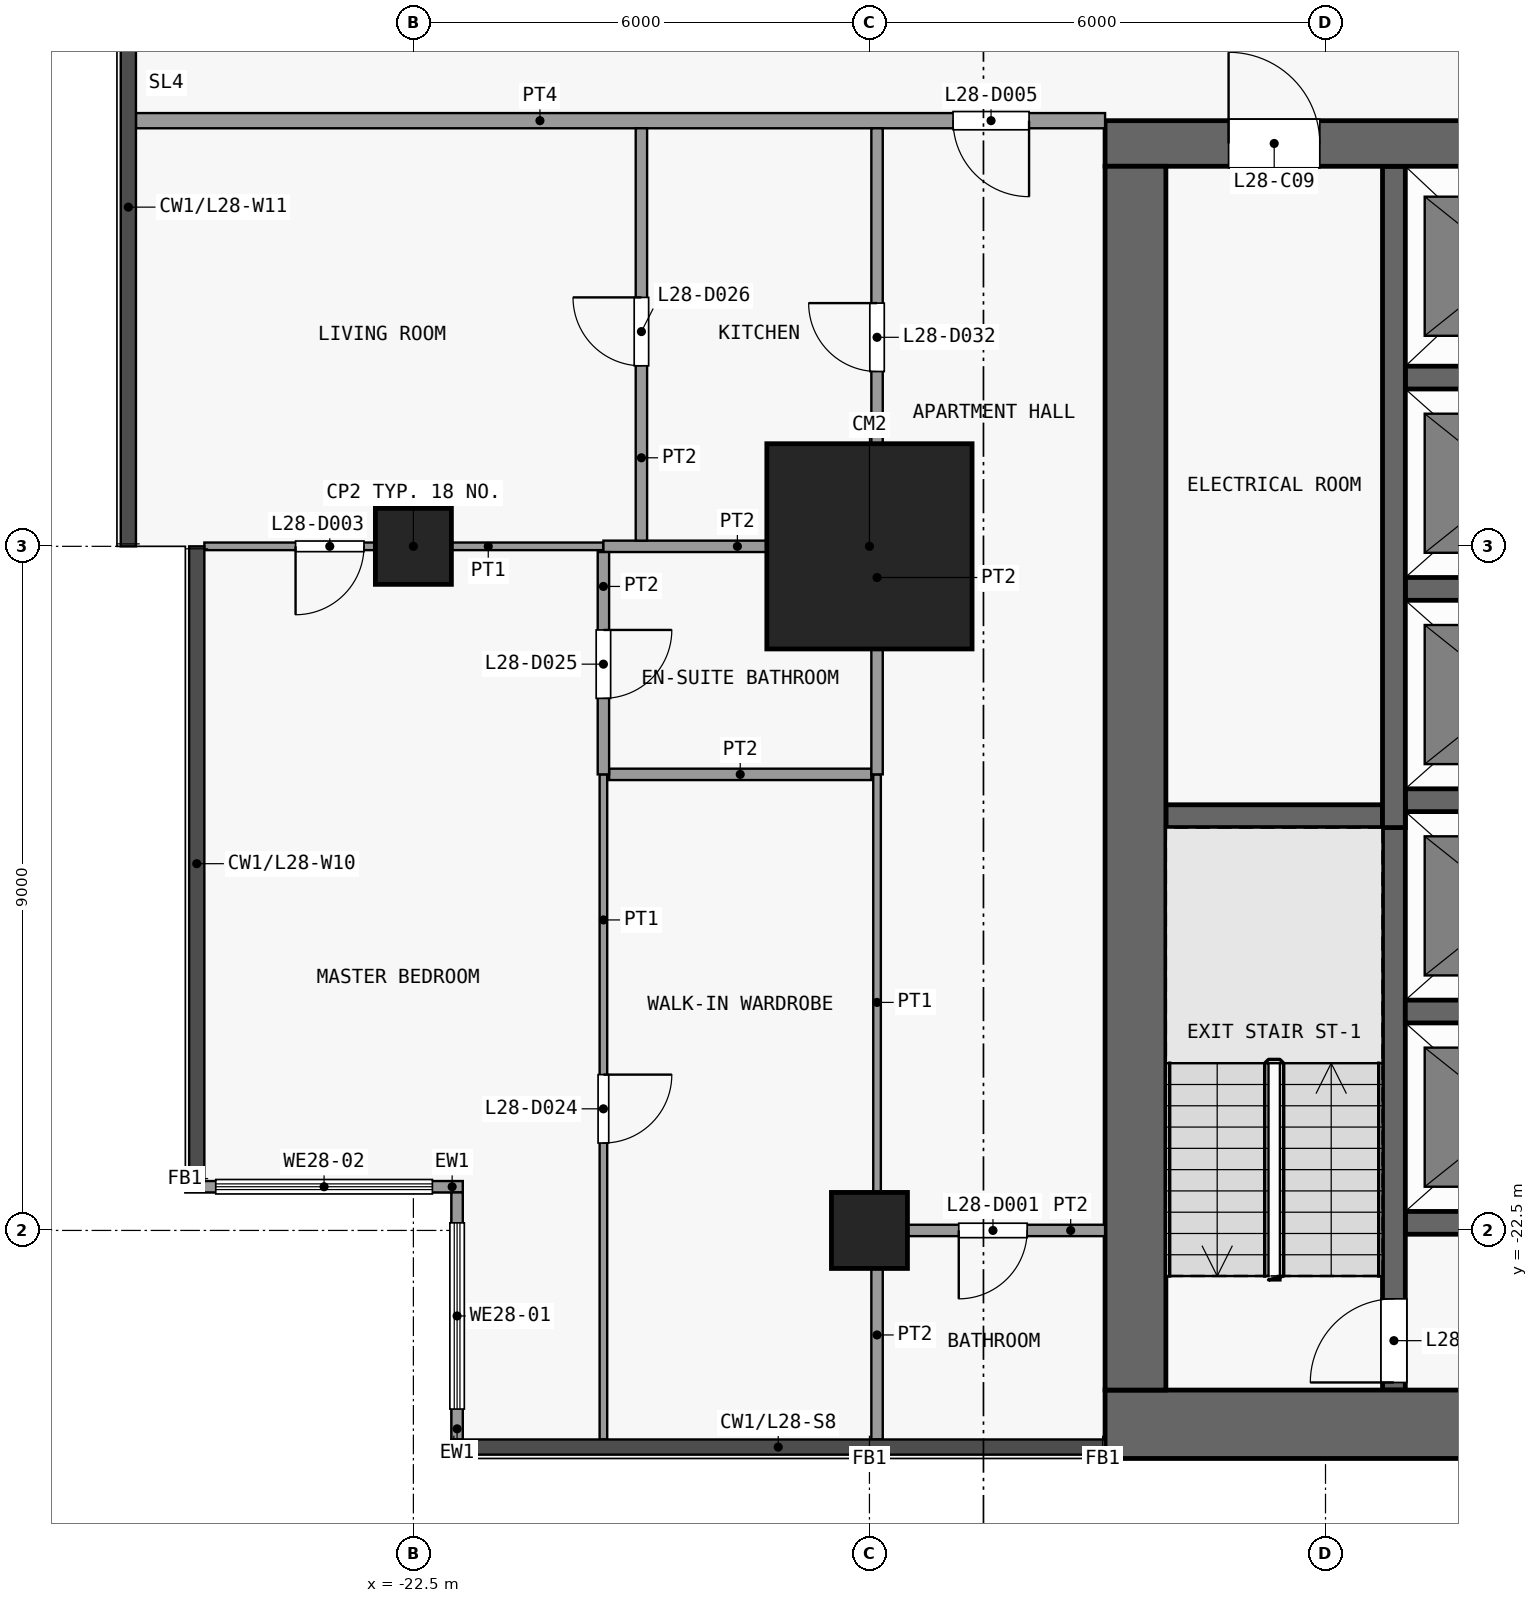
"""IFC4 building model, lengths in metres.
Left out: names, types, materials, properties, quantities, classifications, styles, units other than length and angle.
Written with IfcOpenShell. Run it as: python <this file> out.ifc"""

import sys

from ifc_helpers import new_model, si_unit, direction, frame, frame_2d, origin, origin_2d, place, context, subcontext, project, spatial, rectangle, extrude, element, fill, save


model = new_model("IFC4")
c1 = context("Model", 3, precision=1e-05, world=origin(), true_north=direction((0.0, 1.0)))
c2 = subcontext(c1, "Body", "Model", "MODEL_VIEW")
j1 = project(units=[si_unit("LENGTHUNIT", "METRE"), si_unit("PLANEANGLEUNIT", "RADIAN")], contexts=[c1])
p1 = place(None, origin())
s1 = spatial("IfcSite", under=j1, at=p1, CompositionType="ELEMENT")
p2 = place(p1, origin())
s2 = spatial("IfcBuilding", under=s1, at=p2, CompositionType="ELEMENT")
p3 = place(p2, frame((0.0, 0.0, 113.5)))
s3 = spatial("IfcBuildingStorey", under=s2, at=p3, CompositionType="ELEMENT", Elevation=113.5)
for number, where, z_axis, x_axis in (
    (1, (-22.5, -13.5, 0.0), (0.0, 0.0, 1.0), (1.0, 0.0, 0.0)),
    (2, (-16.5, -22.5, 0.0), (0.0, 0.0, 1.0), (1.0, 0.0, 0.0)),
):
    element("IfcColumn", number, at=place(p3, frame(where, z_axis=z_axis, x_axis=x_axis)), inside=s3, PredefinedType="COLUMN", context=c2, shape_type="SweptSolid", body=[
        extrude(rectangle(XDim=1.0, YDim=1.0, at=origin_2d()), origin(), (0.0, 0.0, 1.0), 3.6),
    ])
p4 = place(p3, frame((-16.5, -13.5, 0.0), z_axis=(0.0, 0.0, 1.0), x_axis=(1.0, 0.0, 0.0)))
e3 = element("IfcColumn", 3, at=p4, inside=s3, PredefinedType="COLUMN", context=c2, shape_type="SweptSolid", body=[
    extrude(rectangle(XDim=2.7, YDim=2.7, at=origin_2d()), origin(), (0.0, 0.0, 1.0), 3.6),
])
p5 = place(p3, frame((-13.4, -25.05, 0.0), z_axis=(0.0, 0.0, 1.0), x_axis=(1.0, 0.0, 0.0)))
e4 = element("IfcWall", 4, at=p5, inside=s3, PredefinedType="SHEAR", context=c2, shape_type="SweptSolid", body=[
    extrude(rectangle(XDim=26.8, YDim=0.9, at=frame_2d((13.4, 0.0))), origin(), (0.0, 0.0, 1.0), 3.3),
])
p6 = place(p3, frame((-13.4, -8.2, 0.0), z_axis=(0.0, 0.0, 1.0), x_axis=(1.0, 0.0, 0.0)))
e5 = element("IfcWall", 5, at=p6, inside=s3, PredefinedType="SHEAR", context=c2, shape_type="SweptSolid", body=[
    extrude(rectangle(XDim=26.8, YDim=0.6, at=frame_2d((13.4, 0.0))), origin(), (0.0, 0.0, 1.0), 3.3),
])
p7 = place(p6, frame((7.7, 0.0, 0.0)))
e6 = element("IfcOpeningElement", 6, at=p7, cuts=e5, PredefinedType="OPENING", context=c2, shape_type="SweptSolid", body=[
    extrude(rectangle(XDim=1.8, YDim=2.1, at=frame_2d((0.9, 1.05))), frame((0.0, 0.31, 0.0), z_axis=(0.0, -1.0, 0.0), x_axis=(1.0, 0.0, 0.0)), (0.0, 0.0, 1.0), 0.62),
])
p8 = place(p6, frame((17.3, 0.0, 0.0)))
e7 = element("IfcOpeningElement", 7, at=p8, cuts=e5, PredefinedType="OPENING", context=c2, shape_type="SweptSolid", body=[
    extrude(rectangle(XDim=1.8, YDim=2.1, at=frame_2d((0.9, 1.05))), frame((0.0, 0.31, 0.0), z_axis=(0.0, -1.0, 0.0), x_axis=(1.0, 0.0, 0.0)), (0.0, 0.0, 1.0), 0.62),
])
p9 = place(p6, frame((1.625, 0.0, 0.0)))
e8 = element("IfcOpeningElement", 8, at=p9, cuts=e5, PredefinedType="OPENING", context=c2, shape_type="SweptSolid", body=[
    extrude(rectangle(XDim=1.2, YDim=2.1, at=frame_2d((0.6, 1.05))), frame((0.0, 0.31, 0.0), z_axis=(0.0, -1.0, 0.0), x_axis=(1.0, 0.0, 0.0)), (0.0, 0.0, 1.0), 0.62),
])
p10 = place(p6, frame((23.275, 0.0, 0.0)))
e9 = element("IfcOpeningElement", 9, at=p10, cuts=e5, PredefinedType="OPENING", context=c2, shape_type="SweptSolid", body=[
    extrude(rectangle(XDim=0.9, YDim=2.1, at=frame_2d((0.45, 1.05))), frame((0.0, 0.31, 0.0), z_axis=(0.0, -1.0, 0.0), x_axis=(1.0, 0.0, 0.0)), (0.0, 0.0, 1.0), 0.62),
])
p11 = place(p3, frame((-13.0, -24.6, 0.0), z_axis=(0.0, 0.0, 1.0), x_axis=(0.0, 1.0, 0.0)))
e10 = element("IfcWall", 10, at=p11, inside=s3, PredefinedType="SHEAR", context=c2, shape_type="SweptSolid", body=[
    extrude(rectangle(XDim=16.1, YDim=0.8, at=frame_2d((8.05, 0.0))), origin(), (0.0, 0.0, 1.0), 3.3),
])
for number, where, z_axis, x_axis in (
    (11, (-9.45, -22.4, 0.0), (0.0, 0.0, 1.0), (1.0, 0.0, 0.0)),
    (12, (-9.45, -19.62, 0.0), (0.0, 0.0, 1.0), (1.0, 0.0, 0.0)),
):
    element("IfcWall", number, at=place(p3, frame(where, z_axis=z_axis, x_axis=x_axis)), inside=s3, PredefinedType="SHEAR", context=c2, shape_type="SweptSolid", body=[
        extrude(rectangle(XDim=2.8, YDim=0.3, at=frame_2d((1.4, 0.0))), origin(), (0.0, 0.0, 1.0), 3.3),
    ])
p12 = place(p3, frame((-12.6, -17.05, 0.0), z_axis=(0.0, 0.0, 1.0), x_axis=(1.0, 0.0, 0.0)))
e13 = element("IfcWall", 13, at=p12, inside=s3, PredefinedType="SHEAR", context=c2, shape_type="SweptSolid", body=[
    extrude(rectangle(XDim=2.85, YDim=0.3, at=frame_2d((1.425, 0.0))), origin(), (0.0, 0.0, 1.0), 3.3),
])
for number, where, z_axis, x_axis in (
    (14, (-9.45, -16.84, 0.0), (0.0, 0.0, 1.0), (1.0, 0.0, 0.0)),
    (15, (-9.45, -14.06, 0.0), (0.0, 0.0, 1.0), (1.0, 0.0, 0.0)),
    (16, (-9.45, -11.28, 0.0), (0.0, 0.0, 1.0), (1.0, 0.0, 0.0)),
):
    element("IfcWall", number, at=place(p3, frame(where, z_axis=z_axis, x_axis=x_axis)), inside=s3, PredefinedType="SHEAR", context=c2, shape_type="SweptSolid", body=[
        extrude(rectangle(XDim=2.8, YDim=0.3, at=frame_2d((1.4, 0.0))), origin(), (0.0, 0.0, 1.0), 3.3),
    ])
p13 = place(p3, frame((-9.6, -24.6, 0.0), z_axis=(0.0, 0.0, 1.0), x_axis=(0.0, 1.0, 0.0)))
e17 = element("IfcWall", 17, at=p13, inside=s3, PredefinedType="SHEAR", context=c2, shape_type="SweptSolid", body=[
    extrude(rectangle(XDim=7.7, YDim=0.3, at=frame_2d((3.85, 0.0))), origin(), (0.0, 0.0, 1.0), 3.3),
])
p14 = place(p13, frame((0.1, 0.0, 0.0)))
e18 = element("IfcOpeningElement", 18, at=p14, cuts=e17, PredefinedType="OPENING", context=c2, shape_type="SweptSolid", body=[
    extrude(rectangle(XDim=1.1, YDim=2.1, at=frame_2d((0.55, 1.05))), frame((0.0, 0.16, 0.0), z_axis=(0.0, -1.0, 0.0), x_axis=(1.0, 0.0, 0.0)), (0.0, 0.0, 1.0), 0.32),
])
p15 = place(p3, frame((-9.6, -17.2, 0.0), z_axis=(0.0, 0.0, 1.0), x_axis=(0.0, 1.0, 0.0)))
e19 = element("IfcWall", 19, at=p15, inside=s3, PredefinedType="SHEAR", context=c2, shape_type="SweptSolid", body=[
    extrude(rectangle(XDim=8.7, YDim=0.3, at=frame_2d((4.35, 0.0))), origin(), (0.0, 0.0, 1.0), 3.3),
])
p16 = place(p3, frame((-21.925, -25.25, 0.0), z_axis=(0.0, 0.0, 1.0), x_axis=(0.0, 1.0, 0.0)))
e20 = element("IfcWall", 20, at=p16, inside=s3, PredefinedType="SOLIDWALL", context=c2, shape_type="SweptSolid", body=[
    extrude(rectangle(XDim=3.25, YDim=0.15, at=frame_2d((1.625, 0.0))), origin(), (0.0, 0.0, 1.0), 3.3),
])
p17 = place(p16, frame((0.4, 0.0, 0.9)))
e21 = element("IfcOpeningElement", 21, at=p17, cuts=e20, PredefinedType="OPENING", context=c2, shape_type="SweptSolid", body=[
    extrude(rectangle(XDim=2.45, YDim=2.4, at=frame_2d((1.225, 1.2))), frame((0.0, 0.085, 0.0), z_axis=(0.0, -1.0, 0.0), x_axis=(1.0, 0.0, 0.0)), (0.0, 0.0, 1.0), 0.17),
])
p18 = place(p3, frame((-21.85, -21.925, 0.0), z_axis=(0.0, 0.0, 1.0), x_axis=(-1.0, 0.0, 0.0)))
e22 = element("IfcWall", 22, at=p18, inside=s3, PredefinedType="SOLIDWALL", context=c2, shape_type="SweptSolid", body=[
    extrude(rectangle(XDim=3.65, YDim=0.15, at=frame_2d((1.825, 0.0))), origin(), (0.0, 0.0, 1.0), 3.3),
])
p19 = place(p18, frame((0.4, 0.0, 0.9)))
e23 = element("IfcOpeningElement", 23, at=p19, cuts=e22, PredefinedType="OPENING", context=c2, shape_type="SweptSolid", body=[
    extrude(rectangle(XDim=2.85, YDim=2.4, at=frame_2d((1.425, 1.2))), frame((0.0, 0.085, 0.0), z_axis=(0.0, -1.0, 0.0), x_axis=(1.0, 0.0, 0.0)), (0.0, 0.0, 1.0), 0.17),
])
p20 = place(p3, frame((-16.325, -22.5, 0.0), z_axis=(0.0, 0.0, 1.0), x_axis=(1.0, 0.0, 0.0)))
e24 = element("IfcWall", 24, at=p20, inside=s3, PredefinedType="PARTITIONING", context=c2, shape_type="SweptSolid", body=[
    extrude(rectangle(XDim=2.925, YDim=0.15, at=frame_2d((1.462, 0.0))), origin(), (0.0, 0.0, 1.0), 3.3),
])
p21 = place(p20, frame((1.0, 0.0, 0.0)))
e25 = element("IfcOpeningElement", 25, at=p21, cuts=e24, PredefinedType="OPENING", context=c2, shape_type="SweptSolid", body=[
    extrude(rectangle(XDim=0.9, YDim=2.1, at=frame_2d((0.45, 1.05))), frame((0.0, 0.085, 0.0), z_axis=(0.0, -1.0, 0.0), x_axis=(1.0, 0.0, 0.0)), (0.0, 0.0, 1.0), 0.17),
])
p22 = place(p3, frame((-19.925, -16.5, 0.0), z_axis=(0.0, 0.0, 1.0), x_axis=(1.0, 0.0, 0.0)))
e26 = element("IfcWall", 26, at=p22, inside=s3, PredefinedType="PARTITIONING", context=c2, shape_type="SweptSolid", body=[
    extrude(rectangle(XDim=3.45, YDim=0.15, at=frame_2d((1.725, 0.0))), origin(), (0.0, 0.0, 1.0), 3.3),
])
p23 = place(p3, frame((-25.25, -13.5, 0.0), z_axis=(0.0, 0.0, 1.0), x_axis=(1.0, 0.0, 0.0)))
e27 = element("IfcWall", 27, at=p23, inside=s3, PredefinedType="PARTITIONING", context=c2, shape_type="SweptSolid", body=[
    extrude(rectangle(XDim=5.25, YDim=0.1, at=frame_2d((2.625, 0.0))), origin(), (0.0, 0.0, 1.0), 3.3),
])
p24 = place(p23, frame((1.2, 0.0, 0.0)))
e28 = element("IfcOpeningElement", 28, at=p24, cuts=e27, PredefinedType="OPENING", context=c2, shape_type="SweptSolid", body=[
    extrude(rectangle(XDim=0.9, YDim=2.1, at=frame_2d((0.45, 1.05))), frame((0.0, 0.06, 0.0), z_axis=(0.0, -1.0, 0.0), x_axis=(1.0, 0.0, 0.0)), (0.0, 0.0, 1.0), 0.12),
])
p25 = place(p3, frame((-20.0, -13.5, 0.0), z_axis=(0.0, 0.0, 1.0), x_axis=(1.0, 0.0, 0.0)))
e29 = element("IfcWall", 29, at=p25, inside=s3, PredefinedType="PARTITIONING", context=c2, shape_type="SweptSolid", body=[
    extrude(rectangle(XDim=3.525, YDim=0.15, at=frame_2d((1.762, 0.0))), origin(), (0.0, 0.0, 1.0), 3.3),
])
p26 = place(p3, frame((-26.15, -7.9, 0.0), z_axis=(0.0, 0.0, 1.0), x_axis=(1.0, 0.0, 0.0)))
e30 = element("IfcWall", 30, at=p26, inside=s3, PredefinedType="PARTITIONING", context=c2, shape_type="SweptSolid", body=[
    extrude(rectangle(XDim=12.75, YDim=0.2, at=frame_2d((6.375, 0.0))), origin(), (0.0, 0.0, 1.0), 3.3),
])
p27 = place(p26, frame((10.75, 0.0, 0.0)))
e31 = element("IfcOpeningElement", 31, at=p27, cuts=e30, PredefinedType="OPENING", context=c2, shape_type="SweptSolid", body=[
    extrude(rectangle(XDim=1.0, YDim=2.1, at=frame_2d((0.5, 1.05))), frame((0.0, 0.11, 0.0), z_axis=(0.0, -1.0, 0.0), x_axis=(1.0, 0.0, 0.0)), (0.0, 0.0, 1.0), 0.22),
])
p28 = place(p3, frame((-20.0, -25.25, 0.0), z_axis=(0.0, 0.0, 1.0), x_axis=(0.0, 1.0, 0.0)))
e32 = element("IfcWall", 32, at=p28, inside=s3, PredefinedType="PARTITIONING", context=c2, shape_type="SweptSolid", body=[
    extrude(rectangle(XDim=8.75, YDim=0.1, at=frame_2d((4.375, 0.0))), origin(), (0.0, 0.0, 1.0), 3.3),
])
p29 = place(p28, frame((3.9, 0.0, 0.0)))
e33 = element("IfcOpeningElement", 33, at=p29, cuts=e32, PredefinedType="OPENING", context=c2, shape_type="SweptSolid", body=[
    extrude(rectangle(XDim=0.9, YDim=2.1, at=frame_2d((0.45, 1.05))), frame((0.0, 0.06, 0.0), z_axis=(0.0, -1.0, 0.0), x_axis=(1.0, 0.0, 0.0)), (0.0, 0.0, 1.0), 0.12),
])
p30 = place(p3, frame((-20.0, -16.5, 0.0), z_axis=(0.0, 0.0, 1.0), x_axis=(0.0, 1.0, 0.0)))
e34 = element("IfcWall", 34, at=p30, inside=s3, PredefinedType="PARTITIONING", context=c2, shape_type="SweptSolid", body=[
    extrude(rectangle(XDim=2.925, YDim=0.15, at=frame_2d((1.462, 0.0))), origin(), (0.0, 0.0, 1.0), 3.3),
])
p31 = place(p30, frame((1.0, 0.0, 0.0)))
e35 = element("IfcOpeningElement", 35, at=p31, cuts=e34, PredefinedType="OPENING", context=c2, shape_type="SweptSolid", body=[
    extrude(rectangle(XDim=0.9, YDim=2.1, at=frame_2d((0.45, 1.05))), frame((0.0, 0.085, 0.0), z_axis=(0.0, -1.0, 0.0), x_axis=(1.0, 0.0, 0.0)), (0.0, 0.0, 1.0), 0.17),
])
p32 = place(p3, frame((-19.5, -13.425, 0.0), z_axis=(0.0, 0.0, 1.0), x_axis=(0.0, 1.0, 0.0)))
e36 = element("IfcWall", 36, at=p32, inside=s3, PredefinedType="PARTITIONING", context=c2, shape_type="SweptSolid", body=[
    extrude(rectangle(XDim=5.425, YDim=0.15, at=frame_2d((2.712, 0.0))), origin(), (0.0, 0.0, 1.0), 3.3),
])
p33 = place(p32, frame((2.3, 0.0, 0.0)))
e37 = element("IfcOpeningElement", 37, at=p33, cuts=e36, PredefinedType="OPENING", context=c2, shape_type="SweptSolid", body=[
    extrude(rectangle(XDim=0.9, YDim=2.1, at=frame_2d((0.45, 1.05))), frame((0.0, 0.085, 0.0), z_axis=(0.0, -1.0, 0.0), x_axis=(1.0, 0.0, 0.0)), (0.0, 0.0, 1.0), 0.17),
])
p34 = place(p3, frame((-16.4, -22.5, 0.0), z_axis=(0.0, 0.0, 1.0), x_axis=(0.0, 1.0, 0.0)))
e38 = element("IfcWall", 38, at=p34, inside=s3, PredefinedType="PARTITIONING", context=c2, shape_type="SweptSolid", body=[
    extrude(rectangle(XDim=6.0, YDim=0.1, at=frame_2d((3.0, 0.0))), origin(), (0.0, 0.0, 1.0), 3.3),
])
p35 = place(p3, frame((-16.4, -25.25, 0.0), z_axis=(0.0, 0.0, 1.0), x_axis=(0.0, 1.0, 0.0)))
e39 = element("IfcWall", 39, at=p35, inside=s3, PredefinedType="PARTITIONING", context=c2, shape_type="SweptSolid", body=[
    extrude(rectangle(XDim=2.75, YDim=0.15, at=frame_2d((1.375, 0.0))), origin(), (0.0, 0.0, 1.0), 3.3),
])
p36 = place(p3, frame((-16.4, -16.5, 0.0), z_axis=(0.0, 0.0, 1.0), x_axis=(0.0, 1.0, 0.0)))
e40 = element("IfcWall", 40, at=p36, inside=s3, PredefinedType="PARTITIONING", context=c2, shape_type="SweptSolid", body=[
    extrude(rectangle(XDim=8.5, YDim=0.15, at=frame_2d((4.25, 0.0))), origin(), (0.0, 0.0, 1.0), 3.3),
])
p37 = place(p36, frame((5.3, 0.0, 0.0)))
e41 = element("IfcOpeningElement", 41, at=p37, cuts=e40, PredefinedType="OPENING", context=c2, shape_type="SweptSolid", body=[
    extrude(rectangle(XDim=0.9, YDim=2.1, at=frame_2d((0.45, 1.05))), frame((0.0, 0.085, 0.0), z_axis=(0.0, -1.0, 0.0), x_axis=(1.0, 0.0, 0.0)), (0.0, 0.0, 1.0), 0.17),
])
p38 = place(p9, origin())
e42 = element("IfcDoor", 42, at=p38, inside=s3, OperationType="SINGLE_SWING_LEFT", PredefinedType="DOOR", context=c2, shape_type="SweptSolid", body=[
    extrude(rectangle(XDim=1.2, YDim=2.1, at=frame_2d((0.6, 1.05))), frame((0.0, 0.025, 0.0), z_axis=(0.0, -1.0, 0.0), x_axis=(1.0, 0.0, 0.0)), (0.0, 0.0, 1.0), 0.05),
])
fill(e8, e42)
p39 = place(p14, origin())
e43 = element("IfcDoor", 43, at=p39, inside=s3, OperationType="SINGLE_SWING_LEFT", PredefinedType="DOOR", context=c2, shape_type="SweptSolid", body=[
    extrude(rectangle(XDim=1.1, YDim=2.1, at=frame_2d((0.55, 1.05))), frame((0.0, 0.025, 0.0), z_axis=(0.0, -1.0, 0.0), x_axis=(1.0, 0.0, 0.0)), (0.0, 0.0, 1.0), 0.05),
])
fill(e18, e43)
p40 = place(p17, origin())
e44 = element("IfcWindow", 44, at=p40, inside=s3, PartitioningType="SINGLE_PANEL", PredefinedType="WINDOW", context=c2, shape_type="SweptSolid", body=[
    extrude(rectangle(XDim=2.45, YDim=2.4, at=frame_2d((1.225, 1.2))), frame((0.0, 0.03, 0.0), z_axis=(0.0, -1.0, 0.0), x_axis=(1.0, 0.0, 0.0)), (0.0, 0.0, 1.0), 0.06),
])
fill(e21, e44)
p41 = place(p19, origin())
e45 = element("IfcWindow", 45, at=p41, inside=s3, PartitioningType="SINGLE_PANEL", PredefinedType="WINDOW", context=c2, shape_type="SweptSolid", body=[
    extrude(rectangle(XDim=2.85, YDim=2.4, at=frame_2d((1.425, 1.2))), frame((0.0, 0.03, 0.0), z_axis=(0.0, -1.0, 0.0), x_axis=(1.0, 0.0, 0.0)), (0.0, 0.0, 1.0), 0.06),
])
fill(e23, e45)
p42 = place(p21, origin())
e46 = element("IfcDoor", 46, at=p42, inside=s3, OperationType="SINGLE_SWING_LEFT", PredefinedType="DOOR", context=c2, shape_type="SweptSolid", body=[
    extrude(rectangle(XDim=0.9, YDim=2.1, at=frame_2d((0.45, 1.05))), frame((0.0, 0.025, 0.0), z_axis=(0.0, -1.0, 0.0), x_axis=(1.0, 0.0, 0.0)), (0.0, 0.0, 1.0), 0.05),
])
fill(e25, e46)
p43 = place(p24, origin())
e47 = element("IfcDoor", 47, at=p43, inside=s3, OperationType="SINGLE_SWING_LEFT", PredefinedType="DOOR", context=c2, shape_type="SweptSolid", body=[
    extrude(rectangle(XDim=0.9, YDim=2.1, at=frame_2d((0.45, 1.05))), frame((0.0, 0.025, 0.0), z_axis=(0.0, -1.0, 0.0), x_axis=(1.0, 0.0, 0.0)), (0.0, 0.0, 1.0), 0.05),
])
fill(e28, e47)
p44 = place(p27, origin())
e48 = element("IfcDoor", 48, at=p44, inside=s3, OperationType="SINGLE_SWING_RIGHT", PredefinedType="DOOR", context=c2, shape_type="SweptSolid", body=[
    extrude(rectangle(XDim=1.0, YDim=2.1, at=frame_2d((0.5, 1.05))), frame((0.0, 0.025, 0.0), z_axis=(0.0, -1.0, 0.0), x_axis=(1.0, 0.0, 0.0)), (0.0, 0.0, 1.0), 0.05),
])
fill(e31, e48)
p45 = place(p29, origin())
e49 = element("IfcDoor", 49, at=p45, inside=s3, OperationType="SINGLE_SWING_RIGHT", PredefinedType="DOOR", context=c2, shape_type="SweptSolid", body=[
    extrude(rectangle(XDim=0.9, YDim=2.1, at=frame_2d((0.45, 1.05))), frame((0.0, 0.025, 0.0), z_axis=(0.0, -1.0, 0.0), x_axis=(1.0, 0.0, 0.0)), (0.0, 0.0, 1.0), 0.05),
])
fill(e33, e49)
p46 = place(p31, origin())
e50 = element("IfcDoor", 50, at=p46, inside=s3, OperationType="SINGLE_SWING_RIGHT", PredefinedType="DOOR", context=c2, shape_type="SweptSolid", body=[
    extrude(rectangle(XDim=0.9, YDim=2.1, at=frame_2d((0.45, 1.05))), frame((0.0, 0.025, 0.0), z_axis=(0.0, -1.0, 0.0), x_axis=(1.0, 0.0, 0.0)), (0.0, 0.0, 1.0), 0.05),
])
fill(e35, e50)
p47 = place(p33, origin())
e51 = element("IfcDoor", 51, at=p47, inside=s3, OperationType="SINGLE_SWING_LEFT", PredefinedType="DOOR", context=c2, shape_type="SweptSolid", body=[
    extrude(rectangle(XDim=0.9, YDim=2.1, at=frame_2d((0.45, 1.05))), frame((0.0, 0.025, 0.0), z_axis=(0.0, -1.0, 0.0), x_axis=(1.0, 0.0, 0.0)), (0.0, 0.0, 1.0), 0.05),
])
fill(e37, e51)
p48 = place(p37, origin())
e52 = element("IfcDoor", 52, at=p48, inside=s3, OperationType="SINGLE_SWING_LEFT", PredefinedType="DOOR", context=c2, shape_type="SweptSolid", body=[
    extrude(rectangle(XDim=0.9, YDim=2.1, at=frame_2d((0.45, 1.05))), frame((0.0, 0.025, 0.0), z_axis=(0.0, -1.0, 0.0), x_axis=(1.0, 0.0, 0.0)), (0.0, 0.0, 1.0), 0.05),
])
fill(e41, e52)
save(model, sys.argv[1])
